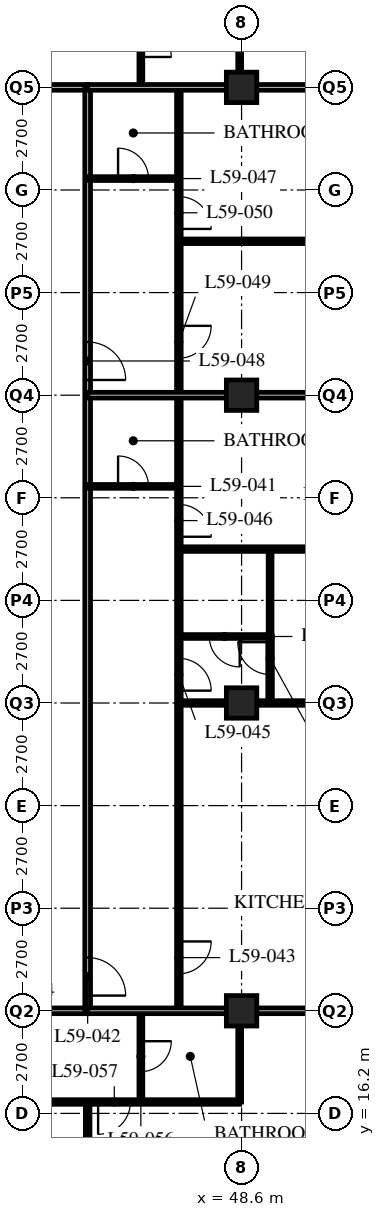
"""IFC4 building model, lengths in metres.
Left out: names, types, materials, properties, quantities, classifications, styles, units other than length and angle.
Written with IfcOpenShell. Run it as: python <this file> out.ifc"""

import sys

from ifc_helpers import new_model, si_unit, direction, frame, frame_2d, origin, origin_2d, place, context, subcontext, project, spatial, rectangle, hollow_rectangle, extrude, element, fill, save


model = new_model("IFC4")
c1 = context("Model", 3, precision=1e-05, world=origin(), true_north=direction((0.0, 1.0)))
c2 = subcontext(c1, "Body", "Model", "MODEL_VIEW")
j1 = project(units=[si_unit("LENGTHUNIT", "METRE"), si_unit("PLANEANGLEUNIT", "RADIAN")], contexts=[c1])
p1 = place(None, origin())
s1 = spatial("IfcSite", under=j1, at=p1, CompositionType="ELEMENT")
p2 = place(p1, origin())
s2 = spatial("IfcBuilding", under=s1, at=p2, CompositionType="ELEMENT")
p3 = place(p2, frame((0.0, 0.0, 228.0)))
s3 = spatial("IfcBuildingStorey", under=s2, at=p3, CompositionType="ELEMENT", Elevation=228.0)
for number, where, z_axis, x_axis in (
    (1, (48.6, 18.9, 0.0), (0.0, 0.0, 1.0), (1.0, 0.0, 0.0)),
    (2, (48.6, 27.0, 0.0), (0.0, 0.0, 1.0), (1.0, 0.0, 0.0)),
    (3, (48.6, 35.1, 0.0), (0.0, 0.0, 1.0), (1.0, 0.0, 0.0)),
    (4, (48.6, 43.2, 0.0), (0.0, 0.0, 1.0), (1.0, 0.0, 0.0)),
):
    element("IfcColumn", number, at=place(p3, frame(where, z_axis=z_axis, x_axis=x_axis)), inside=s3, PredefinedType="COLUMN", context=c2, shape_type="SweptSolid", body=[
        extrude(hollow_rectangle(XDim=0.8, YDim=0.8, WallThickness=0.08, at=origin_2d()), origin(), (0.0, 0.0, 1.0), 3.6),
    ])
p4 = place(p3, frame((8.1, 18.9, 0.0), z_axis=(0.0, 0.0, 1.0), x_axis=(1.0, 0.0, 0.0)))
e5 = element("IfcWall", 5, at=p4, inside=s3, PredefinedType="PARTITIONING", context=c2, shape_type="SweptSolid", body=[
    extrude(rectangle(XDim=36.45, YDim=0.15, at=frame_2d((18.225, 0.0))), origin(), (0.0, 0.0, 1.0), 2.628),
])
p5 = place(p4, frame((4.45, 0.0, 0.0)))
e6 = element("IfcOpeningElement", 6, at=p5, cuts=e5, PredefinedType="OPENING", context=c2, shape_type="SweptSolid", body=[
    extrude(rectangle(XDim=1.0, YDim=2.1, at=frame_2d((0.5, 1.05))), frame((0.0, 0.085, 0.0), z_axis=(0.0, -1.0, 0.0), x_axis=(1.0, 0.0, 0.0)), (0.0, 0.0, 1.0), 0.17),
])
p6 = place(p4, frame((17.1, 0.0, 0.0)))
e7 = element("IfcOpeningElement", 7, at=p6, cuts=e5, PredefinedType="OPENING", context=c2, shape_type="SweptSolid", body=[
    extrude(rectangle(XDim=1.0, YDim=2.1, at=frame_2d((0.5, 1.05))), frame((0.0, 0.085, 0.0), z_axis=(0.0, -1.0, 0.0), x_axis=(1.0, 0.0, 0.0)), (0.0, 0.0, 1.0), 0.17),
])
p7 = place(p4, frame((29.05, 0.0, 0.0)))
e8 = element("IfcOpeningElement", 8, at=p7, cuts=e5, PredefinedType="OPENING", context=c2, shape_type="SweptSolid", body=[
    extrude(rectangle(XDim=1.0, YDim=2.1, at=frame_2d((0.5, 1.05))), frame((0.0, 0.085, 0.0), z_axis=(0.0, -1.0, 0.0), x_axis=(1.0, 0.0, 0.0)), (0.0, 0.0, 1.0), 0.17),
])
p8 = place(p4, frame((2.625, 0.0, 0.0)))
e9 = element("IfcOpeningElement", 9, at=p8, cuts=e5, PredefinedType="OPENING", context=c2, shape_type="SweptSolid", body=[
    extrude(rectangle(XDim=1.0, YDim=2.1, at=frame_2d((0.5, 1.05))), frame((0.0, 0.085, 0.0), z_axis=(0.0, -1.0, 0.0), x_axis=(1.0, 0.0, 0.0)), (0.0, 0.0, 1.0), 0.17),
])
p9 = place(p4, frame((33.925, 0.0, 0.0)))
e10 = element("IfcOpeningElement", 10, at=p9, cuts=e5, PredefinedType="OPENING", context=c2, shape_type="SweptSolid", body=[
    extrude(rectangle(XDim=1.0, YDim=2.1, at=frame_2d((0.5, 1.05))), frame((0.0, 0.085, 0.0), z_axis=(0.0, -1.0, 0.0), x_axis=(1.0, 0.0, 0.0)), (0.0, 0.0, 1.0), 0.17),
])
p10 = place(p3, frame((8.1, 43.2, 0.0), z_axis=(0.0, 0.0, 1.0), x_axis=(1.0, 0.0, 0.0)))
e11 = element("IfcWall", 11, at=p10, inside=s3, PredefinedType="PARTITIONING", context=c2, shape_type="SweptSolid", body=[
    extrude(rectangle(XDim=36.45, YDim=0.15, at=frame_2d((18.225, 0.0))), origin(), (0.0, 0.0, 1.0), 2.628),
])
p11 = place(p10, frame((4.45, 0.0, 0.0)))
e12 = element("IfcOpeningElement", 12, at=p11, cuts=e11, PredefinedType="OPENING", context=c2, shape_type="SweptSolid", body=[
    extrude(rectangle(XDim=1.0, YDim=2.1, at=frame_2d((0.5, 1.05))), frame((0.0, 0.085, 0.0), z_axis=(0.0, -1.0, 0.0), x_axis=(1.0, 0.0, 0.0)), (0.0, 0.0, 1.0), 0.17),
])
p12 = place(p10, frame((17.1, 0.0, 0.0)))
e13 = element("IfcOpeningElement", 13, at=p12, cuts=e11, PredefinedType="OPENING", context=c2, shape_type="SweptSolid", body=[
    extrude(rectangle(XDim=1.0, YDim=2.1, at=frame_2d((0.5, 1.05))), frame((0.0, 0.085, 0.0), z_axis=(0.0, -1.0, 0.0), x_axis=(1.0, 0.0, 0.0)), (0.0, 0.0, 1.0), 0.17),
])
p13 = place(p10, frame((29.05, 0.0, 0.0)))
e14 = element("IfcOpeningElement", 14, at=p13, cuts=e11, PredefinedType="OPENING", context=c2, shape_type="SweptSolid", body=[
    extrude(rectangle(XDim=1.0, YDim=2.1, at=frame_2d((0.5, 1.05))), frame((0.0, 0.085, 0.0), z_axis=(0.0, -1.0, 0.0), x_axis=(1.0, 0.0, 0.0)), (0.0, 0.0, 1.0), 0.17),
])
p14 = place(p10, frame((33.925, 0.0, 0.0)))
e15 = element("IfcOpeningElement", 15, at=p14, cuts=e11, PredefinedType="OPENING", context=c2, shape_type="SweptSolid", body=[
    extrude(rectangle(XDim=1.0, YDim=2.1, at=frame_2d((0.5, 1.05))), frame((0.0, 0.085, 0.0), z_axis=(0.0, -1.0, 0.0), x_axis=(1.0, 0.0, 0.0)), (0.0, 0.0, 1.0), 0.17),
])
p15 = place(p10, frame((1.525, 0.0, 0.0)))
e16 = element("IfcOpeningElement", 16, at=p15, cuts=e11, PredefinedType="OPENING", context=c2, shape_type="SweptSolid", body=[
    extrude(rectangle(XDim=1.0, YDim=2.1, at=frame_2d((0.5, 1.05))), frame((0.0, 0.085, 0.0), z_axis=(0.0, -1.0, 0.0), x_axis=(1.0, 0.0, 0.0)), (0.0, 0.0, 1.0), 0.17),
])
p16 = place(p3, frame((44.55, 18.9, 0.0), z_axis=(0.0, 0.0, 1.0), x_axis=(0.0, 1.0, 0.0)))
e17 = element("IfcWall", 17, at=p16, inside=s3, PredefinedType="PARTITIONING", context=c2, shape_type="SweptSolid", body=[
    extrude(rectangle(XDim=24.3, YDim=0.15, at=frame_2d((12.15, 0.0))), origin(), (0.0, 0.0, 1.0), 3.39),
])
p17 = place(p16, frame((0.4, 0.0, 0.0)))
e18 = element("IfcOpeningElement", 18, at=p17, cuts=e17, PredefinedType="OPENING", context=c2, shape_type="SweptSolid", body=[
    extrude(rectangle(XDim=1.0, YDim=2.1, at=frame_2d((0.5, 1.05))), frame((0.0, 0.085, 0.0), z_axis=(0.0, -1.0, 0.0), x_axis=(1.0, 0.0, 0.0)), (0.0, 0.0, 1.0), 0.17),
])
p18 = place(p16, frame((16.6, 0.0, 0.0)))
e19 = element("IfcOpeningElement", 19, at=p18, cuts=e17, PredefinedType="OPENING", context=c2, shape_type="SweptSolid", body=[
    extrude(rectangle(XDim=1.0, YDim=2.1, at=frame_2d((0.5, 1.05))), frame((0.0, 0.085, 0.0), z_axis=(0.0, -1.0, 0.0), x_axis=(1.0, 0.0, 0.0)), (0.0, 0.0, 1.0), 0.17),
])
p19 = place(p3, frame((46.95, 18.9, 0.0), z_axis=(0.0, 0.0, 1.0), x_axis=(0.0, 1.0, 0.0)))
e20 = element("IfcWall", 20, at=p19, inside=s3, PredefinedType="PARTITIONING", context=c2, shape_type="SweptSolid", body=[
    extrude(rectangle(XDim=24.3, YDim=0.12, at=frame_2d((12.15, 0.0))), origin(), (0.0, 0.0, 1.0), 3.39),
])
p20 = place(p19, frame((0.975, 0.0, 0.0)))
e21 = element("IfcOpeningElement", 21, at=p20, cuts=e20, PredefinedType="OPENING", context=c2, shape_type="SweptSolid", body=[
    extrude(rectangle(XDim=0.85, YDim=2.1, at=frame_2d((0.425, 1.05))), frame((0.0, 0.07, 0.0), z_axis=(0.0, -1.0, 0.0), x_axis=(1.0, 0.0, 0.0)), (0.0, 0.0, 1.0), 0.14),
])
p21 = place(p19, frame((8.425, 0.0, 0.0)))
e22 = element("IfcOpeningElement", 22, at=p21, cuts=e20, PredefinedType="OPENING", context=c2, shape_type="SweptSolid", body=[
    extrude(rectangle(XDim=0.85, YDim=2.1, at=frame_2d((0.425, 1.05))), frame((0.0, 0.07, 0.0), z_axis=(0.0, -1.0, 0.0), x_axis=(1.0, 0.0, 0.0)), (0.0, 0.0, 1.0), 0.14),
])
p22 = place(p19, frame((12.475, 0.0, 0.0)))
e23 = element("IfcOpeningElement", 23, at=p22, cuts=e20, PredefinedType="OPENING", context=c2, shape_type="SweptSolid", body=[
    extrude(rectangle(XDim=0.85, YDim=2.1, at=frame_2d((0.425, 1.05))), frame((0.0, 0.07, 0.0), z_axis=(0.0, -1.0, 0.0), x_axis=(1.0, 0.0, 0.0)), (0.0, 0.0, 1.0), 0.14),
])
p23 = place(p19, frame((17.175, 0.0, 0.0)))
e24 = element("IfcOpeningElement", 24, at=p23, cuts=e20, PredefinedType="OPENING", context=c2, shape_type="SweptSolid", body=[
    extrude(rectangle(XDim=0.85, YDim=2.1, at=frame_2d((0.425, 1.05))), frame((0.0, 0.07, 0.0), z_axis=(0.0, -1.0, 0.0), x_axis=(1.0, 0.0, 0.0)), (0.0, 0.0, 1.0), 0.14),
])
p24 = place(p19, frame((20.575, 0.0, 0.0)))
e25 = element("IfcOpeningElement", 25, at=p24, cuts=e20, PredefinedType="OPENING", context=c2, shape_type="SweptSolid", body=[
    extrude(rectangle(XDim=0.85, YDim=2.1, at=frame_2d((0.425, 1.05))), frame((0.0, 0.07, 0.0), z_axis=(0.0, -1.0, 0.0), x_axis=(1.0, 0.0, 0.0)), (0.0, 0.0, 1.0), 0.14),
])
p25 = place(p3, frame((44.55, 32.7, 0.0), z_axis=(0.0, 0.0, 1.0), x_axis=(1.0, 0.0, 0.0)))
e26 = element("IfcWall", 26, at=p25, inside=s3, PredefinedType="PARTITIONING", context=c2, shape_type="SweptSolid", body=[
    extrude(rectangle(XDim=2.4, YDim=0.1, at=frame_2d((1.2, 0.0))), origin(), (0.0, 0.0, 1.0), 3.39),
])
p26 = place(p25, frame((0.8, 0.0, 0.0)))
e27 = element("IfcOpeningElement", 27, at=p26, cuts=e26, PredefinedType="OPENING", context=c2, shape_type="SweptSolid", body=[
    extrude(rectangle(XDim=0.8, YDim=2.1, at=frame_2d((0.4, 1.05))), frame((0.0, 0.06, 0.0), z_axis=(0.0, -1.0, 0.0), x_axis=(1.0, 0.0, 0.0)), (0.0, 0.0, 1.0), 0.12),
])
p27 = place(p3, frame((46.95, 28.75, 0.0), z_axis=(0.0, 0.0, 1.0), x_axis=(1.0, 0.0, 0.0)))
e28 = element("IfcWall", 28, at=p27, inside=s3, PredefinedType="PARTITIONING", context=c2, shape_type="SweptSolid", body=[
    extrude(rectangle(XDim=2.4, YDim=0.1, at=frame_2d((1.2, 0.0))), origin(), (0.0, 0.0, 1.0), 3.39),
])
p28 = place(p27, frame((0.8, 0.0, 0.0)))
e29 = element("IfcOpeningElement", 29, at=p28, cuts=e28, PredefinedType="OPENING", context=c2, shape_type="SweptSolid", body=[
    extrude(rectangle(XDim=0.8, YDim=2.1, at=frame_2d((0.4, 1.05))), frame((0.0, 0.06, 0.0), z_axis=(0.0, -1.0, 0.0), x_axis=(1.0, 0.0, 0.0)), (0.0, 0.0, 1.0), 0.12),
])
p29 = place(p3, frame((49.35, 28.75, 0.0), z_axis=(0.0, 0.0, 1.0), x_axis=(0.0, 1.0, 0.0)))
e30 = element("IfcWall", 30, at=p29, inside=s3, PredefinedType="PARTITIONING", context=c2, shape_type="SweptSolid", body=[
    extrude(rectangle(XDim=2.3, YDim=0.1, at=frame_2d((1.15, 0.0))), origin(), (0.0, 0.0, 1.0), 3.39),
])
p30 = place(p3, frame((46.95, 27.0, 0.0), z_axis=(0.0, 0.0, 1.0), x_axis=(1.0, 0.0, 0.0)))
e31 = element("IfcWall", 31, at=p30, inside=s3, PredefinedType="PARTITIONING", context=c2, shape_type="SweptSolid", body=[
    extrude(rectangle(XDim=9.45, YDim=0.12, at=frame_2d((4.725, 0.0))), origin(), (0.0, 0.0, 1.0), 2.628),
])
p31 = place(p3, frame((46.95, 31.05, 0.0), z_axis=(0.0, 0.0, 1.0), x_axis=(1.0, 0.0, 0.0)))
e32 = element("IfcWall", 32, at=p31, inside=s3, PredefinedType="PARTITIONING", context=c2, shape_type="SweptSolid", body=[
    extrude(rectangle(XDim=9.45, YDim=0.12, at=frame_2d((4.725, 0.0))), origin(), (0.0, 0.0, 1.0), 3.39),
])
p32 = place(p3, frame((44.55, 35.1, 0.0), z_axis=(0.0, 0.0, 1.0), x_axis=(1.0, 0.0, 0.0)))
e33 = element("IfcWall", 33, at=p32, inside=s3, PredefinedType="PARTITIONING", context=c2, shape_type="SweptSolid", body=[
    extrude(rectangle(XDim=11.85, YDim=0.15, at=frame_2d((5.925, 0.0))), origin(), (0.0, 0.0, 1.0), 2.628),
])
p33 = place(p3, frame((44.55, 40.8, 0.0), z_axis=(0.0, 0.0, 1.0), x_axis=(1.0, 0.0, 0.0)))
e34 = element("IfcWall", 34, at=p33, inside=s3, PredefinedType="PARTITIONING", context=c2, shape_type="SweptSolid", body=[
    extrude(rectangle(XDim=2.4, YDim=0.1, at=frame_2d((1.2, 0.0))), origin(), (0.0, 0.0, 1.0), 3.39),
])
p34 = place(p33, frame((0.8, 0.0, 0.0)))
e35 = element("IfcOpeningElement", 35, at=p34, cuts=e34, PredefinedType="OPENING", context=c2, shape_type="SweptSolid", body=[
    extrude(rectangle(XDim=0.8, YDim=2.1, at=frame_2d((0.4, 1.05))), frame((0.0, 0.06, 0.0), z_axis=(0.0, -1.0, 0.0), x_axis=(1.0, 0.0, 0.0)), (0.0, 0.0, 1.0), 0.12),
])
p35 = place(p3, frame((46.95, 39.15, 0.0), z_axis=(0.0, 0.0, 1.0), x_axis=(1.0, 0.0, 0.0)))
e36 = element("IfcWall", 36, at=p35, inside=s3, PredefinedType="PARTITIONING", context=c2, shape_type="SweptSolid", body=[
    extrude(rectangle(XDim=9.45, YDim=0.12, at=frame_2d((4.725, 0.0))), origin(), (0.0, 0.0, 1.0), 3.39),
])
p36 = place(p3, frame((40.5, 16.5, 0.0), z_axis=(0.0, 0.0, 1.0), x_axis=(1.0, 0.0, 0.0)))
e37 = element("IfcWall", 37, at=p36, inside=s3, PredefinedType="PARTITIONING", context=c2, shape_type="SweptSolid", body=[
    extrude(rectangle(XDim=8.05, YDim=0.12, at=frame_2d((4.025, 0.0))), origin(), (0.0, 0.0, 1.0), 3.39),
])
p37 = place(p36, frame((0.475, 0.0, 0.0)))
e38 = element("IfcOpeningElement", 38, at=p37, cuts=e37, PredefinedType="OPENING", context=c2, shape_type="SweptSolid", body=[
    extrude(rectangle(XDim=0.85, YDim=2.1, at=frame_2d((0.425, 1.05))), frame((0.0, 0.07, 0.0), z_axis=(0.0, -1.0, 0.0), x_axis=(1.0, 0.0, 0.0)), (0.0, 0.0, 1.0), 0.14),
])
p38 = place(p36, frame((4.325, 0.0, 0.0)))
e39 = element("IfcOpeningElement", 39, at=p38, cuts=e37, PredefinedType="OPENING", context=c2, shape_type="SweptSolid", body=[
    extrude(rectangle(XDim=0.85, YDim=2.1, at=frame_2d((0.425, 1.05))), frame((0.0, 0.07, 0.0), z_axis=(0.0, -1.0, 0.0), x_axis=(1.0, 0.0, 0.0)), (0.0, 0.0, 1.0), 0.14),
])
p39 = place(p3, frame((45.95, 18.9, 0.0), z_axis=(0.0, 0.0, 1.0), x_axis=(0.0, -1.0, 0.0)))
e40 = element("IfcWall", 40, at=p39, inside=s3, PredefinedType="PARTITIONING", context=c2, shape_type="SweptSolid", body=[
    extrude(rectangle(XDim=2.4, YDim=0.1, at=frame_2d((1.2, 0.0))), origin(), (0.0, 0.0, 1.0), 3.39),
])
p40 = place(p39, frame((0.8, 0.0, 0.0)))
e41 = element("IfcOpeningElement", 41, at=p40, cuts=e40, PredefinedType="OPENING", context=c2, shape_type="SweptSolid", body=[
    extrude(rectangle(XDim=0.8, YDim=2.1, at=frame_2d((0.4, 1.05))), frame((0.0, 0.06, 0.0), z_axis=(0.0, -1.0, 0.0), x_axis=(1.0, 0.0, 0.0)), (0.0, 0.0, 1.0), 0.12),
])
p41 = place(p3, frame((48.55, 18.9, 0.0), z_axis=(0.0, 0.0, 1.0), x_axis=(0.0, -1.0, 0.0)))
e42 = element("IfcWall", 42, at=p41, inside=s3, PredefinedType="PARTITIONING", context=c2, shape_type="SweptSolid", body=[
    extrude(rectangle(XDim=2.4, YDim=0.1, at=frame_2d((1.2, 0.0))), origin(), (0.0, 0.0, 1.0), 2.628),
])
p42 = place(p3, frame((44.55, 16.5, 0.0), z_axis=(0.0, 0.0, 1.0), x_axis=(0.0, -1.0, 0.0)))
e43 = element("IfcWall", 43, at=p42, inside=s3, PredefinedType="PARTITIONING", context=c2, shape_type="SweptSolid", body=[
    extrude(rectangle(XDim=5.4, YDim=0.12, at=frame_2d((2.7, 0.0))), origin(), (0.0, 0.0, 1.0), 3.39),
])
p43 = place(p3, frame((44.55, 18.9, 0.0), z_axis=(0.0, 0.0, 1.0), x_axis=(1.0, 0.0, 0.0)))
e44 = element("IfcWall", 44, at=p43, inside=s3, PredefinedType="PARTITIONING", context=c2, shape_type="SweptSolid", body=[
    extrude(rectangle(XDim=7.8, YDim=0.15, at=frame_2d((3.9, 0.0))), origin(), (0.0, 0.0, 1.0), 2.628),
])
p44 = place(p3, frame((45.95, 43.2, 0.0), z_axis=(0.0, 0.0, 1.0), x_axis=(0.0, 1.0, 0.0)))
e45 = element("IfcWall", 45, at=p44, inside=s3, PredefinedType="PARTITIONING", context=c2, shape_type="SweptSolid", body=[
    extrude(rectangle(XDim=2.4, YDim=0.1, at=frame_2d((1.2, 0.0))), origin(), (0.0, 0.0, 1.0), 3.39),
])
p45 = place(p44, frame((0.8, 0.0, 0.0)))
e46 = element("IfcOpeningElement", 46, at=p45, cuts=e45, PredefinedType="OPENING", context=c2, shape_type="SweptSolid", body=[
    extrude(rectangle(XDim=0.8, YDim=2.1, at=frame_2d((0.4, 1.05))), frame((0.0, 0.06, 0.0), z_axis=(0.0, -1.0, 0.0), x_axis=(1.0, 0.0, 0.0)), (0.0, 0.0, 1.0), 0.12),
])
p46 = place(p3, frame((48.55, 43.2, 0.0), z_axis=(0.0, 0.0, 1.0), x_axis=(0.0, 1.0, 0.0)))
e47 = element("IfcWall", 47, at=p46, inside=s3, PredefinedType="PARTITIONING", context=c2, shape_type="SweptSolid", body=[
    extrude(rectangle(XDim=2.4, YDim=0.1, at=frame_2d((1.2, 0.0))), origin(), (0.0, 0.0, 1.0), 2.628),
])
p47 = place(p3, frame((44.55, 43.2, 0.0), z_axis=(0.0, 0.0, 1.0), x_axis=(1.0, 0.0, 0.0)))
e48 = element("IfcWall", 48, at=p47, inside=s3, PredefinedType="PARTITIONING", context=c2, shape_type="SweptSolid", body=[
    extrude(rectangle(XDim=11.85, YDim=0.15, at=frame_2d((5.925, 0.0))), origin(), (0.0, 0.0, 1.0), 2.628),
])
p48 = place(p3, frame((49.35, 28.76, 0.0), z_axis=(0.0, 0.0, 1.0), x_axis=(0.0, -1.0, 0.0)))
e49 = element("IfcWall", 49, at=p48, inside=s3, PredefinedType="PARTITIONING", context=c2, shape_type="SweptSolid", body=[
    extrude(rectangle(XDim=1.76, YDim=0.12, at=frame_2d((0.88, 0.0))), origin(), (0.0, 0.0, 1.0), 3.39),
])
p49 = place(p48, frame((0.16, 0.0, 0.0)))
e50 = element("IfcOpeningElement", 50, at=p49, cuts=e49, PredefinedType="OPENING", context=c2, shape_type="SweptSolid", body=[
    extrude(rectangle(XDim=0.85, YDim=2.1, at=frame_2d((0.425, 1.05))), frame((0.0, 0.07, 0.0), z_axis=(0.0, -1.0, 0.0), x_axis=(1.0, 0.0, 0.0)), (0.0, 0.0, 1.0), 0.14),
])
p50 = place(p26, origin())
e51 = element("IfcDoor", 51, at=p50, inside=s3, OperationType="SINGLE_SWING_LEFT", PredefinedType="DOOR", context=c2, shape_type="SweptSolid", body=[
    extrude(rectangle(XDim=0.8, YDim=2.1, at=frame_2d((0.4, 1.05))), frame((0.0, 0.025, 0.0), z_axis=(0.0, -1.0, 0.0), x_axis=(1.0, 0.0, 0.0)), (0.0, 0.0, 1.0), 0.05),
])
fill(e27, e51)
p51 = place(p17, origin())
e52 = element("IfcDoor", 52, at=p51, inside=s3, OperationType="SINGLE_SWING_RIGHT", PredefinedType="DOOR", context=c2, shape_type="SweptSolid", body=[
    extrude(rectangle(XDim=1.0, YDim=2.1, at=frame_2d((0.5, 1.05))), frame((0.0, 0.025, 0.0), z_axis=(0.0, -1.0, 0.0), x_axis=(1.0, 0.0, 0.0)), (0.0, 0.0, 1.0), 0.05),
])
fill(e18, e52)
p52 = place(p20, origin())
e53 = element("IfcDoor", 53, at=p52, inside=s3, OperationType="SINGLE_SWING_LEFT", PredefinedType="DOOR", context=c2, shape_type="SweptSolid", body=[
    extrude(rectangle(XDim=0.85, YDim=2.1, at=frame_2d((0.425, 1.05))), frame((0.0, 0.025, 0.0), z_axis=(0.0, -1.0, 0.0), x_axis=(1.0, 0.0, 0.0)), (0.0, 0.0, 1.0), 0.05),
])
fill(e21, e53)
p53 = place(p28, origin())
e54 = element("IfcDoor", 54, at=p53, inside=s3, OperationType="SINGLE_SWING_LEFT", PredefinedType="DOOR", context=c2, shape_type="SweptSolid", body=[
    extrude(rectangle(XDim=0.8, YDim=2.1, at=frame_2d((0.4, 1.05))), frame((0.0, 0.025, 0.0), z_axis=(0.0, -1.0, 0.0), x_axis=(1.0, 0.0, 0.0)), (0.0, 0.0, 1.0), 0.05),
])
fill(e29, e54)
p54 = place(p21, origin())
e55 = element("IfcDoor", 55, at=p54, inside=s3, OperationType="SINGLE_SWING_RIGHT", PredefinedType="DOOR", context=c2, shape_type="SweptSolid", body=[
    extrude(rectangle(XDim=0.85, YDim=2.1, at=frame_2d((0.425, 1.05))), frame((0.0, 0.025, 0.0), z_axis=(0.0, -1.0, 0.0), x_axis=(1.0, 0.0, 0.0)), (0.0, 0.0, 1.0), 0.05),
])
fill(e22, e55)
p55 = place(p22, origin())
e56 = element("IfcDoor", 56, at=p55, inside=s3, OperationType="SINGLE_SWING_RIGHT", PredefinedType="DOOR", context=c2, shape_type="SweptSolid", body=[
    extrude(rectangle(XDim=0.85, YDim=2.1, at=frame_2d((0.425, 1.05))), frame((0.0, 0.025, 0.0), z_axis=(0.0, -1.0, 0.0), x_axis=(1.0, 0.0, 0.0)), (0.0, 0.0, 1.0), 0.05),
])
fill(e23, e56)
p56 = place(p34, origin())
e57 = element("IfcDoor", 57, at=p56, inside=s3, OperationType="SINGLE_SWING_LEFT", PredefinedType="DOOR", context=c2, shape_type="SweptSolid", body=[
    extrude(rectangle(XDim=0.8, YDim=2.1, at=frame_2d((0.4, 1.05))), frame((0.0, 0.025, 0.0), z_axis=(0.0, -1.0, 0.0), x_axis=(1.0, 0.0, 0.0)), (0.0, 0.0, 1.0), 0.05),
])
fill(e35, e57)
p57 = place(p18, origin())
e58 = element("IfcDoor", 58, at=p57, inside=s3, OperationType="SINGLE_SWING_RIGHT", PredefinedType="DOOR", context=c2, shape_type="SweptSolid", body=[
    extrude(rectangle(XDim=1.0, YDim=2.1, at=frame_2d((0.5, 1.05))), frame((0.0, 0.025, 0.0), z_axis=(0.0, -1.0, 0.0), x_axis=(1.0, 0.0, 0.0)), (0.0, 0.0, 1.0), 0.05),
])
fill(e19, e58)
p58 = place(p23, origin())
e59 = element("IfcDoor", 59, at=p58, inside=s3, OperationType="SINGLE_SWING_LEFT", PredefinedType="DOOR", context=c2, shape_type="SweptSolid", body=[
    extrude(rectangle(XDim=0.85, YDim=2.1, at=frame_2d((0.425, 1.05))), frame((0.0, 0.025, 0.0), z_axis=(0.0, -1.0, 0.0), x_axis=(1.0, 0.0, 0.0)), (0.0, 0.0, 1.0), 0.05),
])
fill(e24, e59)
p59 = place(p24, origin())
e60 = element("IfcDoor", 60, at=p59, inside=s3, OperationType="SINGLE_SWING_RIGHT", PredefinedType="DOOR", context=c2, shape_type="SweptSolid", body=[
    extrude(rectangle(XDim=0.85, YDim=2.1, at=frame_2d((0.425, 1.05))), frame((0.0, 0.025, 0.0), z_axis=(0.0, -1.0, 0.0), x_axis=(1.0, 0.0, 0.0)), (0.0, 0.0, 1.0), 0.05),
])
fill(e25, e60)
p60 = place(p40, origin())
e61 = element("IfcDoor", 61, at=p60, inside=s3, OperationType="SINGLE_SWING_LEFT", PredefinedType="DOOR", context=c2, shape_type="SweptSolid", body=[
    extrude(rectangle(XDim=0.8, YDim=2.1, at=frame_2d((0.4, 1.05))), frame((0.0, 0.025, 0.0), z_axis=(0.0, -1.0, 0.0), x_axis=(1.0, 0.0, 0.0)), (0.0, 0.0, 1.0), 0.05),
])
fill(e41, e61)
p61 = place(p38, origin())
e62 = element("IfcDoor", 62, at=p61, inside=s3, OperationType="SINGLE_SWING_RIGHT", PredefinedType="DOOR", context=c2, shape_type="SweptSolid", body=[
    extrude(rectangle(XDim=0.85, YDim=2.1, at=frame_2d((0.425, 1.05))), frame((0.0, 0.025, 0.0), z_axis=(0.0, -1.0, 0.0), x_axis=(1.0, 0.0, 0.0)), (0.0, 0.0, 1.0), 0.05),
])
fill(e39, e62)
p62 = place(p45, origin())
e63 = element("IfcDoor", 63, at=p62, inside=s3, OperationType="SINGLE_SWING_RIGHT", PredefinedType="DOOR", context=c2, shape_type="SweptSolid", body=[
    extrude(rectangle(XDim=0.8, YDim=2.1, at=frame_2d((0.4, 1.05))), frame((0.0, 0.025, 0.0), z_axis=(0.0, -1.0, 0.0), x_axis=(1.0, 0.0, 0.0)), (0.0, 0.0, 1.0), 0.05),
])
fill(e46, e63)
p63 = place(p49, origin())
e64 = element("IfcDoor", 64, at=p63, inside=s3, OperationType="SINGLE_SWING_RIGHT", PredefinedType="DOOR", context=c2, shape_type="SweptSolid", body=[
    extrude(rectangle(XDim=0.85, YDim=2.1, at=frame_2d((0.425, 1.05))), frame((0.0, 0.025, 0.0), z_axis=(0.0, -1.0, 0.0), x_axis=(1.0, 0.0, 0.0)), (0.0, 0.0, 1.0), 0.05),
])
fill(e50, e64)
save(model, sys.argv[1])
